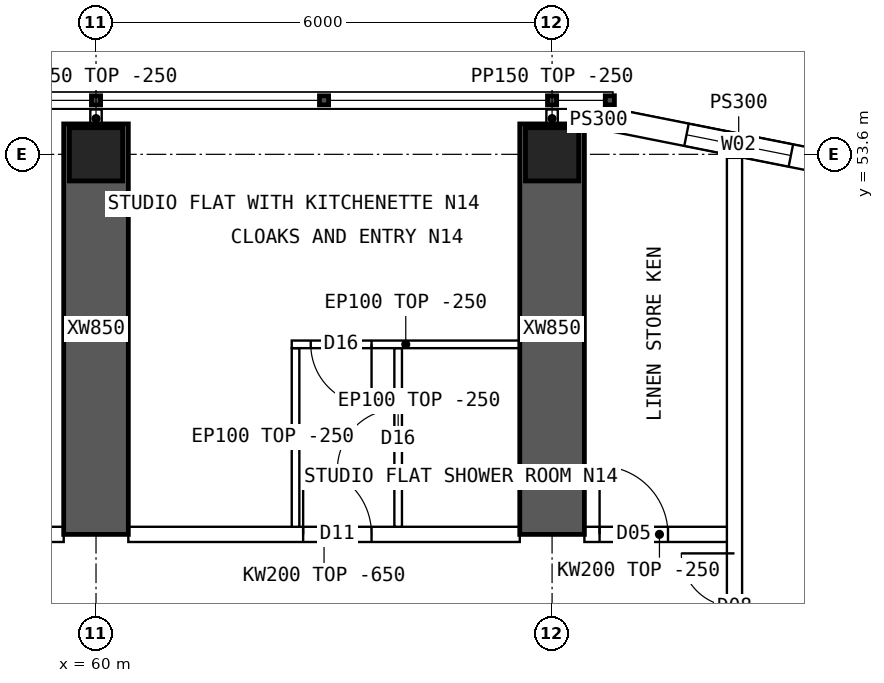
"""IFC4 building model, lengths in metres.
Left out: names, types, materials, properties, quantities, classifications, styles, units other than length and angle.
Written with IfcOpenShell. Run it as: python <this file> out.ifc"""

import sys

from ifc_helpers import new_model, si_unit, direction, frame, frame_2d, origin, origin_2d, place, context, subcontext, project, spatial, polyline, rectangle, hollow_rectangle, outline, extrude, element, fill, save


model = new_model("IFC4")
c1 = context("Model", 3, precision=1e-05, world=origin(), true_north=direction((0.0, 1.0)))
c2 = subcontext(c1, "Body", "Model", "MODEL_VIEW")
j1 = project(units=[si_unit("LENGTHUNIT", "METRE"), si_unit("PLANEANGLEUNIT", "RADIAN")], contexts=[c1])
p1 = place(None, origin())
s1 = spatial("IfcSite", under=j1, at=p1, CompositionType="ELEMENT")
p2 = place(p1, origin())
s2 = spatial("IfcBuilding", under=s1, at=p2, CompositionType="ELEMENT")
p3 = place(p2, frame((0.0, 0.0, 186.1)))
s3 = spatial("IfcBuildingStorey", under=s2, at=p3, CompositionType="ELEMENT", Elevation=186.1)
for number, where, z_axis, x_axis in (
    (1, (60.0, 53.6, 0.0), (0.0, 0.0, 1.0), (1.0, 0.0, 0.0)),
    (2, (66.0, 53.6, 0.0), (0.0, 0.0, 1.0), (1.0, 0.0, 0.0)),
):
    element("IfcColumn", number, at=place(p3, frame(where, z_axis=z_axis, x_axis=x_axis)), inside=s3, PredefinedType="COLUMN", context=c2, shape_type="SweptSolid", body=[
        extrude(hollow_rectangle(XDim=0.7, YDim=0.7, WallThickness=0.07, at=origin_2d()), origin(), (0.0, 0.0, 1.0), 3.75),
    ])
for number, where, z_axis, x_axis in (
    (3, (60.0, 48.6, 0.0), (0.0, 0.0, 1.0), (0.0, 1.0, 0.0)),
    (4, (66.0, 48.6, 0.0), (0.0, 0.0, 1.0), (0.0, 1.0, 0.0)),
):
    element("IfcWall", number, at=place(p3, frame(where, z_axis=z_axis, x_axis=x_axis)), inside=s3, PredefinedType="SHEAR", context=c2, shape_type="SweptSolid", body=[
        extrude(rectangle(XDim=5.4, YDim=0.85, at=frame_2d((2.7, 0.0))), origin(), (0.0, 0.0, 1.0), 3.75),
    ])
p4 = place(p3, frame((70.11, 53.392, 0.0), z_axis=(0.0, 0.0, 1.0), x_axis=(-0.98078325777, 0.195100490205, 0.0)))
e5 = element("IfcWall", 5, at=p4, inside=s3, PredefinedType="SOLIDWALL", context=c2, shape_type="SweptSolid", body=[
    extrude(outline(polyline([(-0.03, -0.15), (3.405, -0.15), (3.345, 0.15), (0.03, 0.15), (-0.03, -0.15)])), origin(), (0.0, 0.0, 1.0), 3.5),
])
p5 = place(p4, frame((0.988, 0.0, 0.9)))
e6 = element("IfcOpeningElement", 6, at=p5, cuts=e5, PredefinedType="OPENING", context=c2, shape_type="SweptSolid", body=[
    extrude(rectangle(XDim=1.4, YDim=1.8, at=frame_2d((0.7, 0.9))), frame((0.0, 0.16, 0.0), z_axis=(0.0, -1.0, 0.0), x_axis=(1.0, 0.0, 0.0)), (0.0, 0.0, 1.0), 0.32),
])
p6 = place(p3, frame((66.8, 54.05, 0.0), z_axis=(0.0, 0.0, 1.0), x_axis=(-1.0, 0.0, 0.0)))
e7 = element("IfcWall", 7, at=p6, inside=s3, PredefinedType="SOLIDWALL", context=c2, shape_type="SweptSolid", body=[
    extrude(rectangle(XDim=0.375, YDim=0.3, at=frame_2d((0.188, 0.0))), origin(), (0.0, 0.0, 1.0), 3.5),
])
p7 = place(p3, frame((54.425, 48.6, 0.0), z_axis=(0.0, 0.0, 1.0), x_axis=(1.0, 0.0, 0.0)))
e8 = element("IfcWall", 8, at=p7, inside=s3, PredefinedType="SOLIDWALL", context=c2, shape_type="SweptSolid", body=[
    extrude(outline(polyline([(0.0, 0.0), (5.15, 0.0), (5.15, 3.1), (0.0, 3.1), (0.0, 0.0)])), frame((0.0, 0.1, 0.0), z_axis=(0.0, -1.0, 0.0), x_axis=(1.0, 0.0, 0.0)), (0.0, 0.0, 1.0), 0.2),
])
p8 = place(p7, frame((2.6, 0.0, 0.0)))
e9 = element("IfcOpeningElement", 9, at=p8, cuts=e8, PredefinedType="OPENING", context=c2, shape_type="SweptSolid", body=[
    extrude(rectangle(XDim=0.9, YDim=2.1, at=frame_2d((0.45, 1.05))), frame((0.0, 0.11, 0.0), z_axis=(0.0, -1.0, 0.0), x_axis=(1.0, 0.0, 0.0)), (0.0, 0.0, 1.0), 0.22),
])
p9 = place(p3, frame((60.425, 48.6, 0.0), z_axis=(0.0, 0.0, 1.0), x_axis=(1.0, 0.0, 0.0)))
e10 = element("IfcWall", 10, at=p9, inside=s3, PredefinedType="SOLIDWALL", context=c2, shape_type="SweptSolid", body=[
    extrude(outline(polyline([(0.0, 0.0), (5.15, 0.0), (5.15, 3.1), (0.0, 3.1), (0.0, 0.0)])), frame((0.0, 0.1, 0.0), z_axis=(0.0, -1.0, 0.0), x_axis=(1.0, 0.0, 0.0)), (0.0, 0.0, 1.0), 0.2),
])
p10 = place(p9, frame((2.3, 0.0, 0.0)))
e11 = element("IfcOpeningElement", 11, at=p10, cuts=e10, PredefinedType="OPENING", context=c2, shape_type="SweptSolid", body=[
    extrude(rectangle(XDim=0.9, YDim=2.1, at=frame_2d((0.45, 1.05))), frame((0.0, 0.11, 0.0), z_axis=(0.0, -1.0, 0.0), x_axis=(1.0, 0.0, 0.0)), (0.0, 0.0, 1.0), 0.22),
])
p11 = place(p3, frame((66.425, 48.6, 0.0), z_axis=(0.0, 0.0, 1.0), x_axis=(1.0, 0.0, 0.0)))
e12 = element("IfcWall", 12, at=p11, inside=s3, PredefinedType="SOLIDWALL", context=c2, shape_type="SweptSolid", body=[
    extrude(rectangle(XDim=1.975, YDim=0.2, at=frame_2d((0.987, 0.0))), origin(), (0.0, 0.0, 1.0), 3.5),
])
p12 = place(p11, frame((0.2, 0.0, 0.0)))
e13 = element("IfcOpeningElement", 13, at=p12, cuts=e12, PredefinedType="OPENING", context=c2, shape_type="SweptSolid", body=[
    extrude(rectangle(XDim=0.9, YDim=2.1, at=frame_2d((0.45, 1.05))), frame((0.0, 0.11, 0.0), z_axis=(0.0, -1.0, 0.0), x_axis=(1.0, 0.0, 0.0)), (0.0, 0.0, 1.0), 0.22),
])
p13 = place(p3, frame((62.575, 51.1, 0.0), z_axis=(0.0, 0.0, 1.0), x_axis=(1.0, 0.0, 0.0)))
e14 = element("IfcWall", 14, at=p13, inside=s3, PredefinedType="PARTITIONING", context=c2, shape_type="SweptSolid", body=[
    extrude(rectangle(XDim=3.0, YDim=0.1, at=frame_2d((1.5, 0.0))), origin(), (0.0, 0.0, 1.0), 3.5),
])
p14 = place(p13, frame((0.25, 0.0, 0.0)))
e15 = element("IfcOpeningElement", 15, at=p14, cuts=e14, PredefinedType="OPENING", context=c2, shape_type="SweptSolid", body=[
    extrude(rectangle(XDim=0.8, YDim=2.1, at=frame_2d((0.4, 1.05))), frame((0.0, 0.06, 0.0), z_axis=(0.0, -1.0, 0.0), x_axis=(1.0, 0.0, 0.0)), (0.0, 0.0, 1.0), 0.12),
])
p15 = place(p3, frame((62.625, 51.05, 0.0), z_axis=(0.0, 0.0, 1.0), x_axis=(0.0, -1.0, 0.0)))
e16 = element("IfcWall", 16, at=p15, inside=s3, PredefinedType="PARTITIONING", context=c2, shape_type="SweptSolid", body=[
    extrude(outline(polyline([(0.0, 0.0), (2.35, 0.0), (2.35, 3.1), (2.302, 3.1), (2.3, 3.5), (0.0, 3.5), (0.0, 0.0)])), frame((0.0, 0.05, 0.0), z_axis=(0.0, -1.0, 0.0), x_axis=(1.0, 0.0, 0.0)), (0.0, 0.0, 1.0), 0.1),
])
p16 = place(p3, frame((63.975, 51.05, 0.0), z_axis=(0.0, 0.0, 1.0), x_axis=(0.0, -1.0, 0.0)))
e17 = element("IfcWall", 17, at=p16, inside=s3, PredefinedType="PARTITIONING", context=c2, shape_type="SweptSolid", body=[
    extrude(outline(polyline([(0.0, 0.0), (2.35, 0.0), (2.35, 3.1), (2.302, 3.1), (2.3, 3.5), (0.0, 3.5), (0.0, 0.0)])), frame((0.0, 0.05, 0.0), z_axis=(0.0, -1.0, 0.0), x_axis=(1.0, 0.0, 0.0)), (0.0, 0.0, 1.0), 0.1),
])
p17 = place(p16, frame((0.8, 0.0, 0.0)))
e18 = element("IfcOpeningElement", 18, at=p17, cuts=e17, PredefinedType="OPENING", context=c2, shape_type="SweptSolid", body=[
    extrude(rectangle(XDim=0.8, YDim=2.1, at=frame_2d((0.4, 1.05))), frame((0.0, 0.06, 0.0), z_axis=(0.0, -1.0, 0.0), x_axis=(1.0, 0.0, 0.0)), (0.0, 0.0, 1.0), 0.12),
])
p18 = place(p3, frame((68.4, 10.446, 0.0), z_axis=(0.0, 0.0, 1.0), x_axis=(0.0, 1.0, 0.0)))
e19 = element("IfcWall", 19, at=p18, inside=s3, PredefinedType="SOLIDWALL", context=c2, shape_type="SweptSolid", body=[
    extrude(rectangle(XDim=43.107, YDim=0.2, at=frame_2d((21.554, 0.0))), origin(), (0.0, 0.0, 1.0), 3.5),
])
p19 = place(p18, frame((5.104, 0.0, 0.0)))
e20 = element("IfcOpeningElement", 20, at=p19, cuts=e19, PredefinedType="OPENING", context=c2, shape_type="SweptSolid", body=[
    extrude(rectangle(XDim=1.4, YDim=2.1, at=frame_2d((0.7, 1.05))), frame((0.0, 0.11, 0.0), z_axis=(0.0, -1.0, 0.0), x_axis=(1.0, 0.0, 0.0)), (0.0, 0.0, 1.0), 0.22),
])
p20 = place(p18, frame((36.504, 0.0, 0.0)))
e21 = element("IfcOpeningElement", 21, at=p20, cuts=e19, PredefinedType="OPENING", context=c2, shape_type="SweptSolid", body=[
    extrude(rectangle(XDim=1.4, YDim=2.1, at=frame_2d((0.7, 1.05))), frame((0.0, 0.11, 0.0), z_axis=(0.0, -1.0, 0.0), x_axis=(1.0, 0.0, 0.0)), (0.0, 0.0, 1.0), 0.22),
])
for number, where, z_axis, x_axis in (
    (22, (60.0, 53.95, 0.0), (0.0, 0.0, 1.0), (0.0, 1.0, 0.0)),
    (23, (66.0, 53.95, 0.0), (0.0, 0.0, 1.0), (0.0, 1.0, 0.0)),
):
    element("IfcWall", number, at=place(p3, frame(where, z_axis=z_axis, x_axis=x_axis)), inside=s3, PredefinedType="PARTITIONING", context=c2, shape_type="SweptSolid", body=[
        extrude(rectangle(XDim=0.24, YDim=0.15, at=frame_2d((0.12, 0.0))), origin(), (0.0, 0.0, 1.0), 3.5),
    ])
p21 = place(p5, origin())
e24 = element("IfcWindow", 24, at=p21, inside=s3, PartitioningType="SINGLE_PANEL", PredefinedType="WINDOW", context=c2, shape_type="SweptSolid", body=[
    extrude(rectangle(XDim=1.4, YDim=1.8, at=frame_2d((0.7, 0.9))), frame((0.0, 0.03, 0.0), z_axis=(0.0, -1.0, 0.0), x_axis=(1.0, 0.0, 0.0)), (0.0, 0.0, 1.0), 0.06),
])
fill(e6, e24)
p22 = place(p14, origin())
e25 = element("IfcDoor", 25, at=p22, inside=s3, OperationType="SINGLE_SWING_RIGHT", PredefinedType="DOOR", context=c2, shape_type="SweptSolid", body=[
    extrude(rectangle(XDim=0.8, YDim=2.1, at=frame_2d((0.4, 1.05))), frame((0.0, 0.025, 0.0), z_axis=(0.0, -1.0, 0.0), x_axis=(1.0, 0.0, 0.0)), (0.0, 0.0, 1.0), 0.05),
])
fill(e15, e25)
p23 = place(p17, origin())
e26 = element("IfcDoor", 26, at=p23, inside=s3, OperationType="SINGLE_SWING_RIGHT", PredefinedType="DOOR", context=c2, shape_type="SweptSolid", body=[
    extrude(rectangle(XDim=0.8, YDim=2.1, at=frame_2d((0.4, 1.05))), frame((0.0, 0.025, 0.0), z_axis=(0.0, -1.0, 0.0), x_axis=(1.0, 0.0, 0.0)), (0.0, 0.0, 1.0), 0.05),
])
fill(e18, e26)
p24 = place(p10, origin())
e27 = element("IfcDoor", 27, at=p24, inside=s3, OperationType="SINGLE_SWING_LEFT", PredefinedType="DOOR", context=c2, shape_type="SweptSolid", body=[
    extrude(rectangle(XDim=0.9, YDim=2.1, at=frame_2d((0.45, 1.05))), frame((0.0, 0.025, 0.0), z_axis=(0.0, -1.0, 0.0), x_axis=(1.0, 0.0, 0.0)), (0.0, 0.0, 1.0), 0.05),
])
fill(e11, e27)
p25 = place(p20, origin())
e28 = element("IfcDoor", 28, at=p25, inside=s3, OperationType="DOUBLE_DOOR_SINGLE_SWING", PredefinedType="DOOR", context=c2, shape_type="SweptSolid", body=[
    extrude(rectangle(XDim=1.4, YDim=2.1, at=frame_2d((0.7, 1.05))), frame((0.0, 0.025, 0.0), z_axis=(0.0, -1.0, 0.0), x_axis=(1.0, 0.0, 0.0)), (0.0, 0.0, 1.0), 0.05),
])
fill(e21, e28)
p26 = place(p12, origin())
e29 = element("IfcDoor", 29, at=p26, inside=s3, OperationType="SINGLE_SWING_LEFT", PredefinedType="DOOR", context=c2, shape_type="SweptSolid", body=[
    extrude(rectangle(XDim=0.9, YDim=2.1, at=frame_2d((0.45, 1.05))), frame((0.0, 0.025, 0.0), z_axis=(0.0, -1.0, 0.0), x_axis=(1.0, 0.0, 0.0)), (0.0, 0.0, 1.0), 0.05),
])
fill(e13, e29)
save(model, sys.argv[1])
